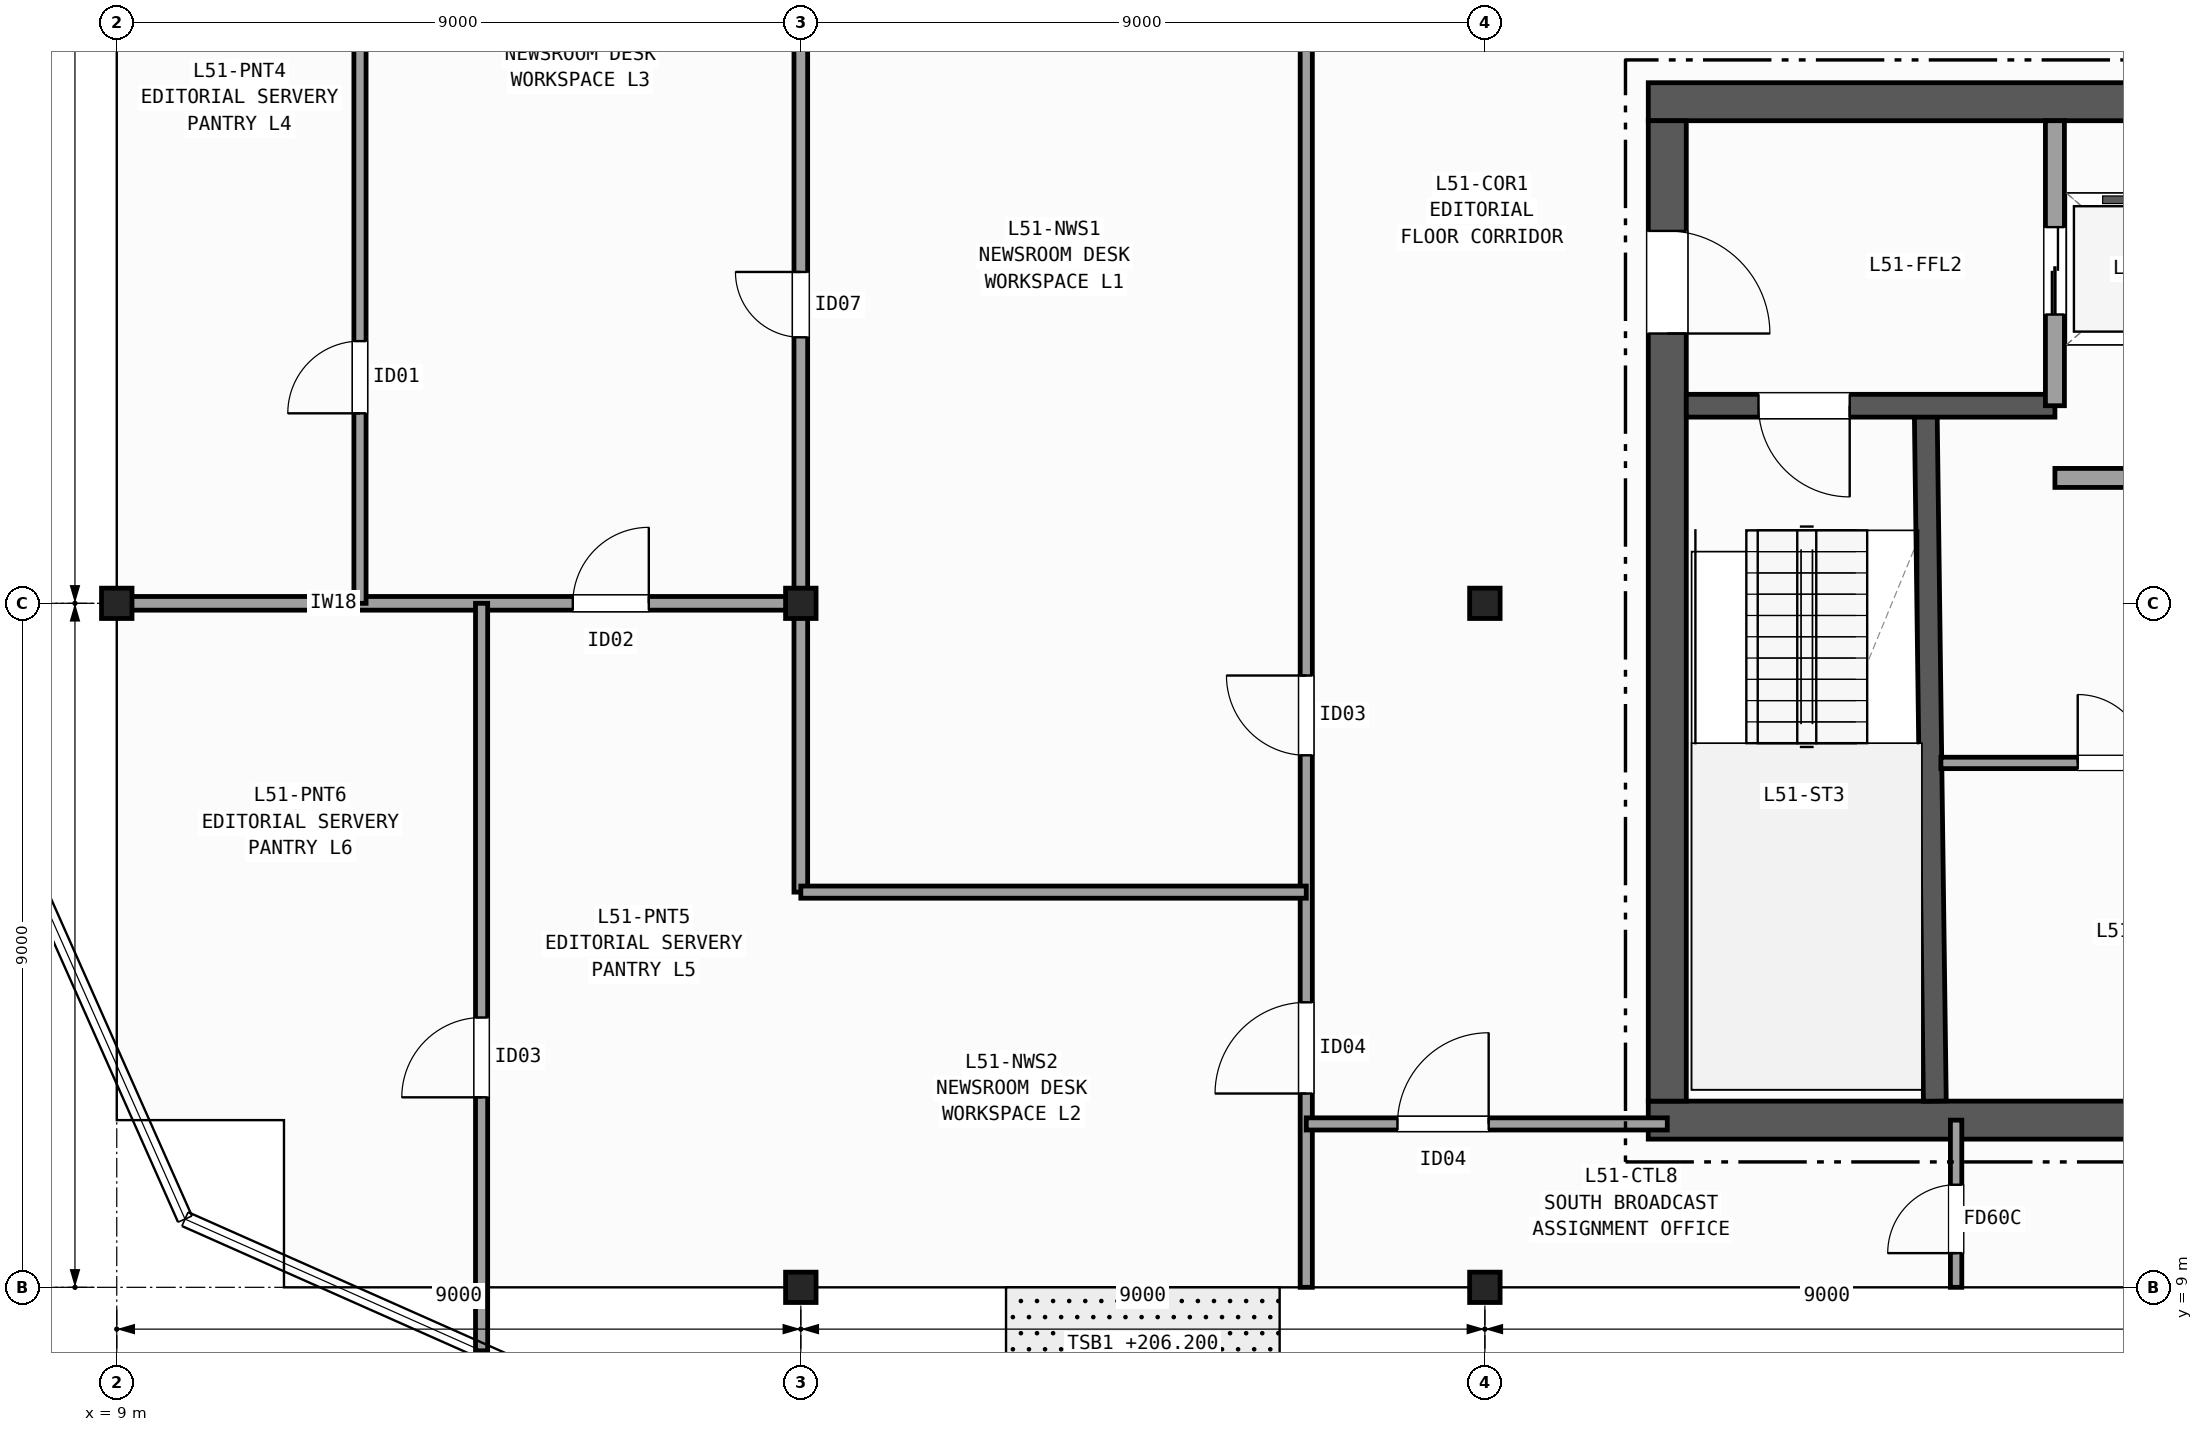
"""IFC4 building model, lengths in metres.
Left out: names, types, materials, properties, quantities, classifications, styles, units other than length and angle.
Written with IfcOpenShell. Run it as: python <this file> out.ifc"""

import sys

from ifc_helpers import new_model, si_unit, direction, frame, frame_2d, origin, origin_2d, place, context, subcontext, project, spatial, rectangle, i_section, extrude, element, fill, save


model = new_model("IFC4")
c1 = context("Model", 3, precision=1e-05, world=origin(), true_north=direction((0.0, 1.0)))
c2 = subcontext(c1, "Body", "Model", "MODEL_VIEW")
j1 = project(units=[si_unit("LENGTHUNIT", "METRE"), si_unit("PLANEANGLEUNIT", "RADIAN")], contexts=[c1])
p1 = place(None, origin())
s1 = spatial("IfcSite", under=j1, at=p1, CompositionType="ELEMENT")
p2 = place(p1, origin())
s2 = spatial("IfcBuilding", under=s1, at=p2, CompositionType="ELEMENT")
p3 = place(p2, frame((0.0, 0.0, 206.2)))
s3 = spatial("IfcBuildingStorey", under=s2, at=p3, CompositionType="ELEMENT", Elevation=206.2)
for number, where, z_axis, x_axis in (
    (1, (9.0, 18.0, 0.0), (0.0, 0.0, 1.0), (1.0, 0.0, 0.0)),
    (2, (18.0, 9.0, 0.0), (0.0, 0.0, 1.0), (1.0, 0.0, 0.0)),
    (3, (18.0, 18.0, 0.0), (0.0, 0.0, 1.0), (1.0, 0.0, 0.0)),
    (4, (27.0, 9.0, 0.0), (0.0, 0.0, 1.0), (1.0, 0.0, 0.0)),
    (5, (27.0, 18.0, 0.0), (0.0, 0.0, 1.0), (1.0, 0.0, 0.0)),
):
    element("IfcColumn", number, at=place(p3, frame(where, z_axis=z_axis, x_axis=x_axis)), inside=s3, PredefinedType="COLUMN", context=c2, shape_type="SweptSolid", body=[
        extrude(i_section(OverallWidth=0.401, OverallDepth=0.399, WebThickness=0.025, FlangeThickness=0.04, FilletRadius=0.015, at=origin_2d()), origin(), (0.0, 0.0, 1.0), 3.7),
    ])
p4 = place(p3, frame((29.15, 11.2, 0.0), z_axis=(0.0, 0.0, 1.0), x_axis=(1.0, 0.0, 0.0)))
e6 = element("IfcWall", 6, at=p4, inside=s3, PredefinedType="SHEAR", context=c2, shape_type="SweptSolid", body=[
    extrude(rectangle(XDim=13.9, YDim=0.5, at=frame_2d((6.95, 0.0))), origin(), (0.0, 0.0, 1.0), 3.42),
])
p5 = place(p3, frame((43.05, 24.6, 0.0), z_axis=(0.0, 0.0, 1.0), x_axis=(-1.0, 0.0, 0.0)))
e7 = element("IfcWall", 7, at=p5, inside=s3, PredefinedType="SHEAR", context=c2, shape_type="SweptSolid", body=[
    extrude(rectangle(XDim=13.9, YDim=0.5, at=frame_2d((6.95, 0.0))), origin(), (0.0, 0.0, 1.0), 3.42),
])
p6 = place(p5, frame((0.75, 0.0, 0.0)))
e8 = element("IfcOpeningElement", 8, at=p6, cuts=e7, PredefinedType="OPENING", context=c2, shape_type="SweptSolid", body=[
    extrude(rectangle(XDim=1.1, YDim=2.15, at=frame_2d((0.55, 1.075))), frame((0.0, 0.26, 0.0), z_axis=(0.0, -1.0, 0.0), x_axis=(1.0, 0.0, 0.0)), (0.0, 0.0, 1.0), 0.52),
])
p7 = place(p5, frame((2.7, 0.0, 0.0)))
e9 = element("IfcOpeningElement", 9, at=p7, cuts=e7, PredefinedType="OPENING", context=c2, shape_type="SweptSolid", body=[
    extrude(rectangle(XDim=0.9, YDim=2.1, at=frame_2d((0.45, 1.05))), frame((0.0, 0.26, 0.0), z_axis=(0.0, -1.0, 0.0), x_axis=(1.0, 0.0, 0.0)), (0.0, 0.0, 1.0), 0.52),
])
p8 = place(p5, frame((4.6, 0.0, 0.0)))
e10 = element("IfcOpeningElement", 10, at=p8, cuts=e7, PredefinedType="OPENING", context=c2, shape_type="SweptSolid", body=[
    extrude(rectangle(XDim=0.9, YDim=2.1, at=frame_2d((0.45, 1.05))), frame((0.0, 0.26, 0.0), z_axis=(0.0, -1.0, 0.0), x_axis=(1.0, 0.0, 0.0)), (0.0, 0.0, 1.0), 0.52),
])
p9 = place(p3, frame((29.4, 24.35, 0.0), z_axis=(0.0, 0.0, 1.0), x_axis=(0.0, -1.0, 0.0)))
e11 = element("IfcWall", 11, at=p9, inside=s3, PredefinedType="SHEAR", context=c2, shape_type="SweptSolid", body=[
    extrude(rectangle(XDim=12.9, YDim=0.5, at=frame_2d((6.45, 0.0))), origin(), (0.0, 0.0, 1.0), 3.42),
])
p10 = place(p9, frame((1.45, 0.0, 0.0)))
e12 = element("IfcOpeningElement", 12, at=p10, cuts=e11, PredefinedType="OPENING", context=c2, shape_type="SweptSolid", body=[
    extrude(rectangle(XDim=1.35, YDim=2.15, at=frame_2d((0.675, 1.075))), frame((0.0, 0.26, 0.0), z_axis=(0.0, -1.0, 0.0), x_axis=(1.0, 0.0, 0.0)), (0.0, 0.0, 1.0), 0.52),
])
p11 = place(p3, frame((32.92, 11.45, 0.0), z_axis=(0.0, 0.0, 1.0), x_axis=(-0.013171578211, 0.999913251001, 0.0)))
e13 = element("IfcWall", 13, at=p11, inside=s3, PredefinedType="SHEAR", context=c2, shape_type="SweptSolid", body=[
    extrude(rectangle(XDim=9.101, YDim=0.3, at=frame_2d((4.55, 0.0))), origin(), (0.0, 0.0, 1.0), 3.42),
])
p12 = place(p3, frame((34.5, 20.6, 0.0), z_axis=(0.0, 0.0, 1.0), x_axis=(-1.0, 0.0, 0.0)))
e14 = element("IfcWall", 14, at=p12, inside=s3, PredefinedType="SHEAR", context=c2, shape_type="SweptSolid", body=[
    extrude(rectangle(XDim=4.85, YDim=0.3, at=frame_2d((2.425, 0.0))), origin(), (0.0, 0.0, 1.0), 3.42),
])
p13 = place(p12, frame((2.7, 0.0, 0.0)))
e15 = element("IfcOpeningElement", 15, at=p13, cuts=e14, PredefinedType="OPENING", context=c2, shape_type="SweptSolid", body=[
    extrude(rectangle(XDim=1.2, YDim=2.15, at=frame_2d((0.6, 1.075))), frame((0.0, 0.16, 0.0), z_axis=(0.0, -1.0, 0.0), x_axis=(1.0, 0.0, 0.0)), (0.0, 0.0, 1.0), 0.32),
])
p14 = place(p3, frame((34.5, 20.6, 0.0), z_axis=(0.0, 0.0, 1.0), x_axis=(0.0, 1.0, 0.0)))
e16 = element("IfcWall", 16, at=p14, inside=s3, PredefinedType="PARTITIONING", context=c2, shape_type="SweptSolid", body=[
    extrude(rectangle(XDim=3.75, YDim=0.25, at=frame_2d((1.875, 0.0))), origin(), (0.0, 0.0, 1.0), 3.42),
])
p15 = place(p14, frame((1.2, 0.0, 0.0)))
e17 = element("IfcOpeningElement", 17, at=p15, cuts=e16, PredefinedType="OPENING", context=c2, shape_type="SweptSolid", body=[
    extrude(rectangle(XDim=1.15, YDim=2.15, at=frame_2d((0.575, 1.075))), frame((0.0, 0.135, 0.0), z_axis=(0.0, -1.0, 0.0), x_axis=(1.0, 0.0, 0.0)), (0.0, 0.0, 1.0), 0.27),
])
p16 = place(p3, frame((34.5, 19.65, 0.0), z_axis=(0.0, 0.0, 1.0), x_axis=(1.0, 0.0, 0.0)))
e18 = element("IfcWall", 18, at=p16, inside=s3, PredefinedType="PARTITIONING", context=c2, shape_type="SweptSolid", body=[
    extrude(rectangle(XDim=6.48, YDim=0.25, at=frame_2d((3.24, 0.0))), origin(), (0.0, 0.0, 1.0), 3.42),
])
p17 = place(p3, frame((33.0, 15.9, 0.0), z_axis=(0.0, 0.0, 1.0), x_axis=(1.0, 0.0, 0.0)))
e19 = element("IfcWall", 19, at=p17, inside=s3, PredefinedType="PARTITIONING", context=c2, shape_type="SweptSolid", body=[
    extrude(rectangle(XDim=5.1, YDim=0.15, at=frame_2d((2.55, 0.0))), origin(), (0.0, 0.0, 1.0), 3.42),
])
p18 = place(p17, frame((1.8, 0.0, 0.0)))
e20 = element("IfcOpeningElement", 20, at=p18, cuts=e19, PredefinedType="OPENING", context=c2, shape_type="SweptSolid", body=[
    extrude(rectangle(XDim=0.9, YDim=2.1, at=frame_2d((0.45, 1.05))), frame((0.0, 0.085, 0.0), z_axis=(0.0, -1.0, 0.0), x_axis=(1.0, 0.0, 0.0)), (0.0, 0.0, 1.0), 0.17),
])
p19 = place(p3, frame((24.65, 9.0, 0.0), z_axis=(0.0, 0.0, 1.0), x_axis=(0.0, 1.0, 0.0)))
e21 = element("IfcWall", 21, at=p19, inside=s3, PredefinedType="PARTITIONING", context=c2, shape_type="SweptSolid", body=[
    extrude(rectangle(XDim=19.2, YDim=0.16, at=frame_2d((9.6, 0.0))), origin(), (0.0, 0.0, 1.0), 2.707),
])
p20 = place(p19, frame((7.0, 0.0, 0.0)))
e22 = element("IfcOpeningElement", 22, at=p20, cuts=e21, PredefinedType="OPENING", context=c2, shape_type="SweptSolid", body=[
    extrude(rectangle(XDim=1.05, YDim=2.15, at=frame_2d((0.525, 1.075))), frame((0.0, 0.09, 0.0), z_axis=(0.0, -1.0, 0.0), x_axis=(1.0, 0.0, 0.0)), (0.0, 0.0, 1.0), 0.18),
])
p21 = place(p19, frame((2.55, 0.0, 0.0)))
e23 = element("IfcOpeningElement", 23, at=p21, cuts=e21, PredefinedType="OPENING", context=c2, shape_type="SweptSolid", body=[
    extrude(rectangle(XDim=1.2, YDim=2.15, at=frame_2d((0.6, 1.075))), frame((0.0, 0.09, 0.0), z_axis=(0.0, -1.0, 0.0), x_axis=(1.0, 0.0, 0.0)), (0.0, 0.0, 1.0), 0.18),
])
p22 = place(p3, frame((9.0, 18.0, 0.0), z_axis=(0.0, 0.0, 1.0), x_axis=(1.0, 0.0, 0.0)))
e24 = element("IfcWall", 24, at=p22, inside=s3, PredefinedType="PARTITIONING", context=c2, shape_type="SweptSolid", body=[
    extrude(rectangle(XDim=9.08, YDim=0.18, at=frame_2d((4.54, 0.0))), origin(), (0.0, 0.0, 1.0), 2.707),
])
p23 = place(p22, frame((6.0, 0.0, 0.0)))
e25 = element("IfcOpeningElement", 25, at=p23, cuts=e24, PredefinedType="OPENING", context=c2, shape_type="SweptSolid", body=[
    extrude(rectangle(XDim=1.0, YDim=2.1, at=frame_2d((0.5, 1.05))), frame((0.0, 0.1, 0.0), z_axis=(0.0, -1.0, 0.0), x_axis=(1.0, 0.0, 0.0)), (0.0, 0.0, 1.0), 0.2),
])
p24 = place(p3, frame((18.0, 14.2, 0.0), z_axis=(0.0, 0.0, 1.0), x_axis=(0.0, 1.0, 0.0)))
e26 = element("IfcWall", 26, at=p24, inside=s3, PredefinedType="PARTITIONING", context=c2, shape_type="SweptSolid", body=[
    extrude(rectangle(XDim=13.93, YDim=0.18, at=frame_2d((6.965, 0.0))), origin(), (0.0, 0.0, 1.0), 2.789),
])
p25 = place(p24, frame((7.3, 0.0, 0.0)))
e27 = element("IfcOpeningElement", 27, at=p25, cuts=e26, PredefinedType="OPENING", context=c2, shape_type="SweptSolid", body=[
    extrude(rectangle(XDim=0.86, YDim=2.05, at=frame_2d((0.43, 1.025))), frame((0.0, 0.1, 0.0), z_axis=(0.0, -1.0, 0.0), x_axis=(1.0, 0.0, 0.0)), (0.0, 0.0, 1.0), 0.2),
])
p26 = place(p3, frame((18.0, 14.2, 0.0), z_axis=(0.0, 0.0, 1.0), x_axis=(1.0, 0.0, 0.0)))
e28 = element("IfcWall", 28, at=p26, inside=s3, PredefinedType="PARTITIONING", context=c2, shape_type="SweptSolid", body=[
    extrude(rectangle(XDim=6.65, YDim=0.16, at=frame_2d((3.325, 0.0))), origin(), (0.0, 0.0, 1.0), 2.789),
])
p27 = place(p3, frame((12.2, 18.0, 0.0), z_axis=(0.0, 0.0, 1.0), x_axis=(0.0, 1.0, 0.0)))
e29 = element("IfcWall", 29, at=p27, inside=s3, PredefinedType="PARTITIONING", context=c2, shape_type="SweptSolid", body=[
    extrude(rectangle(XDim=10.13, YDim=0.16, at=frame_2d((5.065, 0.0))), origin(), (0.0, 0.0, 1.0), 2.789),
])
p28 = place(p27, frame((2.5, 0.0, 0.0)))
e30 = element("IfcOpeningElement", 30, at=p28, cuts=e29, PredefinedType="OPENING", context=c2, shape_type="SweptSolid", body=[
    extrude(rectangle(XDim=0.95, YDim=2.1, at=frame_2d((0.475, 1.05))), frame((0.0, 0.09, 0.0), z_axis=(0.0, -1.0, 0.0), x_axis=(1.0, 0.0, 0.0)), (0.0, 0.0, 1.0), 0.18),
])
p29 = place(p3, frame((13.8, 8.165, 0.0), z_axis=(0.0, 0.0, 1.0), x_axis=(0.0, 1.0, 0.0)))
e31 = element("IfcWall", 31, at=p29, inside=s3, PredefinedType="PARTITIONING", context=c2, shape_type="SweptSolid", body=[
    extrude(rectangle(XDim=9.835, YDim=0.16, at=frame_2d((4.917, 0.0))), origin(), (0.0, 0.0, 1.0), 2.789),
])
p30 = place(p29, frame((3.335, 0.0, 0.0)))
e32 = element("IfcOpeningElement", 32, at=p30, cuts=e31, PredefinedType="OPENING", context=c2, shape_type="SweptSolid", body=[
    extrude(rectangle(XDim=1.05, YDim=2.15, at=frame_2d((0.525, 1.075))), frame((0.0, 0.09, 0.0), z_axis=(0.0, -1.0, 0.0), x_axis=(1.0, 0.0, 0.0)), (0.0, 0.0, 1.0), 0.18),
])
p31 = place(p3, frame((24.65, 11.15, 0.0), z_axis=(0.0, 0.0, 1.0), x_axis=(1.0, 0.0, 0.0)))
e33 = element("IfcWall", 33, at=p31, inside=s3, PredefinedType="PARTITIONING", context=c2, shape_type="SweptSolid", body=[
    extrude(rectangle(XDim=4.75, YDim=0.16, at=frame_2d((2.375, 0.0))), origin(), (0.0, 0.0, 1.0), 2.792),
])
p32 = place(p31, frame((1.2, 0.0, 0.0)))
e34 = element("IfcOpeningElement", 34, at=p32, cuts=e33, PredefinedType="OPENING", context=c2, shape_type="SweptSolid", body=[
    extrude(rectangle(XDim=1.2, YDim=2.15, at=frame_2d((0.6, 1.075))), frame((0.0, 0.09, 0.0), z_axis=(0.0, -1.0, 0.0), x_axis=(1.0, 0.0, 0.0)), (0.0, 0.0, 1.0), 0.18),
])
p33 = place(p3, frame((33.2, 9.0, 0.0), z_axis=(0.0, 0.0, 1.0), x_axis=(0.0, 1.0, 0.0)))
e35 = element("IfcWall", 35, at=p33, inside=s3, PredefinedType="PARTITIONING", context=c2, shape_type="SweptSolid", body=[
    extrude(rectangle(XDim=2.2, YDim=0.15, at=frame_2d((1.1, 0.0))), origin(), (0.0, 0.0, 1.0), 2.707),
])
p34 = place(p33, frame((0.45, 0.0, 0.0)))
e36 = element("IfcOpeningElement", 36, at=p34, cuts=e35, PredefinedType="OPENING", context=c2, shape_type="SweptSolid", body=[
    extrude(rectangle(XDim=0.9, YDim=2.1, at=frame_2d((0.45, 1.05))), frame((0.0, 0.085, 0.0), z_axis=(0.0, -1.0, 0.0), x_axis=(1.0, 0.0, 0.0)), (0.0, 0.0, 1.0), 0.17),
])
p35 = place(p13, origin())
e37 = element("IfcDoor", 37, at=p35, inside=s3, OperationType="SINGLE_SWING_LEFT", PredefinedType="DOOR", context=c2, shape_type="SweptSolid", body=[
    extrude(rectangle(XDim=1.2, YDim=2.15, at=frame_2d((0.6, 1.075))), frame((0.0, 0.025, 0.0), z_axis=(0.0, -1.0, 0.0), x_axis=(1.0, 0.0, 0.0)), (0.0, 0.0, 1.0), 0.05),
])
fill(e15, e37)
p36 = place(p10, origin())
e38 = element("IfcDoor", 38, at=p36, inside=s3, OperationType="SINGLE_SWING_RIGHT", PredefinedType="DOOR", context=c2, shape_type="SweptSolid", body=[
    extrude(rectangle(XDim=1.35, YDim=2.15, at=frame_2d((0.675, 1.075))), frame((0.0, 0.025, 0.0), z_axis=(0.0, -1.0, 0.0), x_axis=(1.0, 0.0, 0.0)), (0.0, 0.0, 1.0), 0.05),
])
fill(e12, e38)
p37 = place(p15, origin())
e39 = element("IfcDoor", 39, at=p37, inside=s3, OperationType="DOUBLE_DOOR_SLIDING", PredefinedType="DOOR", context=c2, shape_type="SweptSolid", body=[
    extrude(rectangle(XDim=1.15, YDim=2.15, at=frame_2d((0.575, 1.075))), frame((0.0, 0.025, 0.0), z_axis=(0.0, -1.0, 0.0), x_axis=(1.0, 0.0, 0.0)), (0.0, 0.0, 1.0), 0.05),
])
fill(e17, e39)
p38 = place(p18, origin())
e40 = element("IfcDoor", 40, at=p38, inside=s3, OperationType="SINGLE_SWING_LEFT", PredefinedType="DOOR", context=c2, shape_type="SweptSolid", body=[
    extrude(rectangle(XDim=0.9, YDim=2.1, at=frame_2d((0.45, 1.05))), frame((0.0, 0.025, 0.0), z_axis=(0.0, -1.0, 0.0), x_axis=(1.0, 0.0, 0.0)), (0.0, 0.0, 1.0), 0.05),
])
fill(e20, e40)
p39 = place(p20, origin())
e41 = element("IfcDoor", 41, at=p39, inside=s3, OperationType="SINGLE_SWING_RIGHT", PredefinedType="DOOR", context=c2, shape_type="SweptSolid", body=[
    extrude(rectangle(XDim=1.05, YDim=2.15, at=frame_2d((0.525, 1.075))), frame((0.0, 0.025, 0.0), z_axis=(0.0, -1.0, 0.0), x_axis=(1.0, 0.0, 0.0)), (0.0, 0.0, 1.0), 0.05),
])
fill(e22, e41)
p40 = place(p21, origin())
e42 = element("IfcDoor", 42, at=p40, inside=s3, OperationType="SINGLE_SWING_LEFT", PredefinedType="DOOR", context=c2, shape_type="SweptSolid", body=[
    extrude(rectangle(XDim=1.2, YDim=2.15, at=frame_2d((0.6, 1.075))), frame((0.0, 0.025, 0.0), z_axis=(0.0, -1.0, 0.0), x_axis=(1.0, 0.0, 0.0)), (0.0, 0.0, 1.0), 0.05),
])
fill(e23, e42)
p41 = place(p25, origin())
e43 = element("IfcDoor", 43, at=p41, inside=s3, OperationType="SINGLE_SWING_RIGHT", PredefinedType="DOOR", context=c2, shape_type="SweptSolid", body=[
    extrude(rectangle(XDim=0.86, YDim=2.05, at=frame_2d((0.43, 1.025))), frame((0.0, 0.025, 0.0), z_axis=(0.0, -1.0, 0.0), x_axis=(1.0, 0.0, 0.0)), (0.0, 0.0, 1.0), 0.05),
])
fill(e27, e43)
p42 = place(p28, origin())
e44 = element("IfcDoor", 44, at=p42, inside=s3, OperationType="SINGLE_SWING_LEFT", PredefinedType="DOOR", context=c2, shape_type="SweptSolid", body=[
    extrude(rectangle(XDim=0.95, YDim=2.1, at=frame_2d((0.475, 1.05))), frame((0.0, 0.025, 0.0), z_axis=(0.0, -1.0, 0.0), x_axis=(1.0, 0.0, 0.0)), (0.0, 0.0, 1.0), 0.05),
])
fill(e30, e44)
p43 = place(p23, origin())
e45 = element("IfcDoor", 45, at=p43, inside=s3, OperationType="SINGLE_SWING_RIGHT", PredefinedType="DOOR", context=c2, shape_type="SweptSolid", body=[
    extrude(rectangle(XDim=1.0, YDim=2.1, at=frame_2d((0.5, 1.05))), frame((0.0, 0.025, 0.0), z_axis=(0.0, -1.0, 0.0), x_axis=(1.0, 0.0, 0.0)), (0.0, 0.0, 1.0), 0.05),
])
fill(e25, e45)
p44 = place(p30, origin())
e46 = element("IfcDoor", 46, at=p44, inside=s3, OperationType="SINGLE_SWING_LEFT", PredefinedType="DOOR", context=c2, shape_type="SweptSolid", body=[
    extrude(rectangle(XDim=1.05, YDim=2.15, at=frame_2d((0.525, 1.075))), frame((0.0, 0.025, 0.0), z_axis=(0.0, -1.0, 0.0), x_axis=(1.0, 0.0, 0.0)), (0.0, 0.0, 1.0), 0.05),
])
fill(e32, e46)
p45 = place(p32, origin())
e47 = element("IfcDoor", 47, at=p45, inside=s3, OperationType="SINGLE_SWING_RIGHT", PredefinedType="DOOR", context=c2, shape_type="SweptSolid", body=[
    extrude(rectangle(XDim=1.2, YDim=2.15, at=frame_2d((0.6, 1.075))), frame((0.0, 0.025, 0.0), z_axis=(0.0, -1.0, 0.0), x_axis=(1.0, 0.0, 0.0)), (0.0, 0.0, 1.0), 0.05),
])
fill(e34, e47)
p46 = place(p34, origin())
e48 = element("IfcDoor", 48, at=p46, inside=s3, OperationType="SINGLE_SWING_LEFT", PredefinedType="DOOR", context=c2, shape_type="SweptSolid", body=[
    extrude(rectangle(XDim=0.9, YDim=2.1, at=frame_2d((0.45, 1.05))), frame((0.0, 0.025, 0.0), z_axis=(0.0, -1.0, 0.0), x_axis=(1.0, 0.0, 0.0)), (0.0, 0.0, 1.0), 0.05),
])
fill(e36, e48)
save(model, sys.argv[1])
